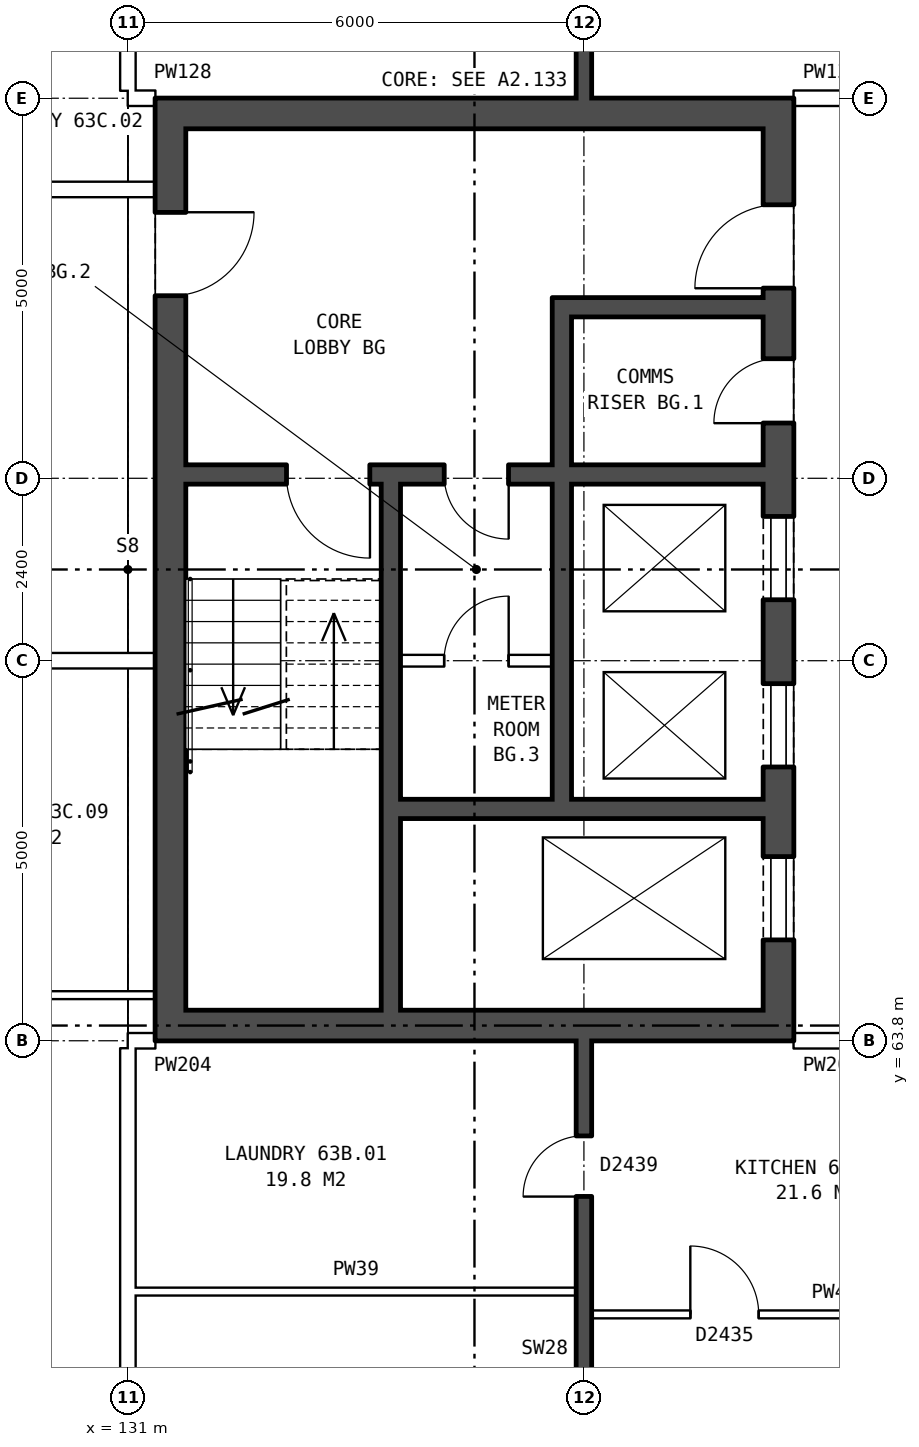
"""IFC4 building model, lengths in metres.
Left out: names, types, materials, properties, quantities, classifications, styles, units other than length and angle.
Written with IfcOpenShell. Run it as: python <this file> out.ifc"""

import sys

from ifc_helpers import new_model, si_unit, direction, frame, frame_2d, origin, place, context, subcontext, project, spatial, rectangle, extrude, element, fill, save


model = new_model("IFC4")
c1 = context("Model", 3, precision=1e-05, world=origin(), true_north=direction((0.0, 1.0)))
c2 = subcontext(c1, "Body", "Model", "MODEL_VIEW")
j1 = project(units=[si_unit("LENGTHUNIT", "METRE"), si_unit("PLANEANGLEUNIT", "RADIAN")], contexts=[c1])
p1 = place(None, origin())
s1 = spatial("IfcSite", under=j1, at=p1, CompositionType="ELEMENT")
p2 = place(p1, origin())
s2 = spatial("IfcBuilding", under=s1, at=p2, CompositionType="ELEMENT")
p3 = place(p2, frame((0.0, 0.0, 224.5)))
s3 = spatial("IfcBuildingStorey", under=s2, at=p3, CompositionType="ELEMENT", Elevation=224.5)
p4 = place(p3, frame((139.56, 63.8, 0.0), z_axis=(0.0, 0.0, 1.0), x_axis=(0.0, 1.0, 0.0)))
e1 = element("IfcWall", 1, at=p4, inside=s3, PredefinedType="SHEAR", context=c2, shape_type="SweptSolid", body=[
    extrude(rectangle(XDim=12.4, YDim=0.4, at=frame_2d((6.2, 0.0))), origin(), (0.0, 0.0, 1.0), 2.85),
])
p5 = place(p4, frame((1.325, 0.0, 0.0)))
e2 = element("IfcOpeningElement", 2, at=p5, cuts=e1, PredefinedType="OPENING", context=c2, shape_type="SweptSolid", body=[
    extrude(rectangle(XDim=1.1, YDim=2.1, at=frame_2d((0.55, 1.05))), frame((0.0, 0.21, 0.0), z_axis=(0.0, -1.0, 0.0), x_axis=(1.0, 0.0, 0.0)), (0.0, 0.0, 1.0), 0.42),
])
p6 = place(p4, frame((3.6, 0.0, 0.0)))
e3 = element("IfcOpeningElement", 3, at=p6, cuts=e1, PredefinedType="OPENING", context=c2, shape_type="SweptSolid", body=[
    extrude(rectangle(XDim=1.1, YDim=2.1, at=frame_2d((0.55, 1.05))), frame((0.0, 0.21, 0.0), z_axis=(0.0, -1.0, 0.0), x_axis=(1.0, 0.0, 0.0)), (0.0, 0.0, 1.0), 0.42),
])
p7 = place(p4, frame((5.8, 0.0, 0.0)))
e4 = element("IfcOpeningElement", 4, at=p7, cuts=e1, PredefinedType="OPENING", context=c2, shape_type="SweptSolid", body=[
    extrude(rectangle(XDim=1.1, YDim=2.1, at=frame_2d((0.55, 1.05))), frame((0.0, 0.21, 0.0), z_axis=(0.0, -1.0, 0.0), x_axis=(1.0, 0.0, 0.0)), (0.0, 0.0, 1.0), 0.42),
])
p8 = place(p4, frame((9.9, 0.0, 0.0)))
e5 = element("IfcOpeningElement", 5, at=p8, cuts=e1, PredefinedType="OPENING", context=c2, shape_type="SweptSolid", body=[
    extrude(rectangle(XDim=1.1, YDim=2.1, at=frame_2d((0.55, 1.05))), frame((0.0, 0.21, 0.0), z_axis=(0.0, -1.0, 0.0), x_axis=(1.0, 0.0, 0.0)), (0.0, 0.0, 1.0), 0.42),
])
p9 = place(p4, frame((8.125, 0.0, 0.0)))
e6 = element("IfcOpeningElement", 6, at=p9, cuts=e1, PredefinedType="OPENING", context=c2, shape_type="SweptSolid", body=[
    extrude(rectangle(XDim=0.85, YDim=2.1, at=frame_2d((0.425, 1.05))), frame((0.0, 0.21, 0.0), z_axis=(0.0, -1.0, 0.0), x_axis=(1.0, 0.0, 0.0)), (0.0, 0.0, 1.0), 0.42),
])
p10 = place(p3, frame((131.56, 63.8, 0.0), z_axis=(0.0, 0.0, 1.0), x_axis=(0.0, 1.0, 0.0)))
e7 = element("IfcWall", 7, at=p10, inside=s3, PredefinedType="SHEAR", context=c2, shape_type="SweptSolid", body=[
    extrude(rectangle(XDim=12.4, YDim=0.4, at=frame_2d((6.2, 0.0))), origin(), (0.0, 0.0, 1.0), 2.85),
])
p11 = place(p10, frame((9.8, 0.0, 0.0)))
e8 = element("IfcOpeningElement", 8, at=p11, cuts=e7, PredefinedType="OPENING", context=c2, shape_type="SweptSolid", body=[
    extrude(rectangle(XDim=1.1, YDim=2.1, at=frame_2d((0.55, 1.05))), frame((0.0, 0.21, 0.0), z_axis=(0.0, -1.0, 0.0), x_axis=(1.0, 0.0, 0.0)), (0.0, 0.0, 1.0), 0.42),
])
for number, where, z_axis, x_axis in (
    (9, (139.36, 64.0, 0.0), (0.0, 0.0, 1.0), (-1.0, 0.0, 0.0)),
    (10, (139.36, 76.0, 0.0), (0.0, 0.0, 1.0), (-1.0, 0.0, 0.0)),
):
    element("IfcWall", number, at=place(p3, frame(where, z_axis=z_axis, x_axis=x_axis)), inside=s3, PredefinedType="SHEAR", context=c2, shape_type="SweptSolid", body=[
        extrude(rectangle(XDim=7.6, YDim=0.4, at=frame_2d((3.8, 0.0))), origin(), (0.0, 0.0, 1.0), 2.85),
    ])
p12 = place(p3, frame((139.36, 66.85, 0.0), z_axis=(0.0, 0.0, 1.0), x_axis=(-1.0, 0.0, 0.0)))
e11 = element("IfcWall", 11, at=p12, inside=s3, PredefinedType="SHEAR", context=c2, shape_type="SweptSolid", body=[
    extrude(rectangle(XDim=4.775, YDim=0.25, at=frame_2d((2.388, 0.0))), origin(), (0.0, 0.0, 1.0), 2.85),
])
p13 = place(p3, frame((136.585, 68.8, 0.0), z_axis=(0.0, 0.0, 1.0), x_axis=(-1.0, 0.0, 0.0)))
e12 = element("IfcWall", 12, at=p13, inside=s3, PredefinedType="PARTITIONING", context=c2, shape_type="SweptSolid", body=[
    extrude(rectangle(XDim=2.0, YDim=0.15, at=frame_2d((1.0, 0.0))), origin(), (0.0, 0.0, 1.0), 2.85),
])
p14 = place(p13, frame((0.575, 0.0, 0.0)))
e13 = element("IfcOpeningElement", 13, at=p14, cuts=e12, PredefinedType="OPENING", context=c2, shape_type="SweptSolid", body=[
    extrude(rectangle(XDim=0.85, YDim=2.1, at=frame_2d((0.425, 1.05))), frame((0.0, 0.085, 0.0), z_axis=(0.0, -1.0, 0.0), x_axis=(1.0, 0.0, 0.0)), (0.0, 0.0, 1.0), 0.17),
])
p15 = place(p3, frame((139.36, 71.25, 0.0), z_axis=(0.0, 0.0, 1.0), x_axis=(-1.0, 0.0, 0.0)))
e14 = element("IfcWall", 14, at=p15, inside=s3, PredefinedType="SHEAR", context=c2, shape_type="SweptSolid", body=[
    extrude(rectangle(XDim=7.6, YDim=0.25, at=frame_2d((3.8, 0.0))), origin(), (0.0, 0.0, 1.0), 2.85),
])
p16 = place(p15, frame((5.175, 0.0, 0.0)))
e15 = element("IfcOpeningElement", 15, at=p16, cuts=e14, PredefinedType="OPENING", context=c2, shape_type="SweptSolid", body=[
    extrude(rectangle(XDim=1.1, YDim=2.1, at=frame_2d((0.55, 1.05))), frame((0.0, 0.135, 0.0), z_axis=(0.0, -1.0, 0.0), x_axis=(1.0, 0.0, 0.0)), (0.0, 0.0, 1.0), 0.27),
])
p17 = place(p15, frame((3.35, 0.0, 0.0)))
e16 = element("IfcOpeningElement", 16, at=p17, cuts=e14, PredefinedType="OPENING", context=c2, shape_type="SweptSolid", body=[
    extrude(rectangle(XDim=0.85, YDim=2.1, at=frame_2d((0.425, 1.05))), frame((0.0, 0.135, 0.0), z_axis=(0.0, -1.0, 0.0), x_axis=(1.0, 0.0, 0.0)), (0.0, 0.0, 1.0), 0.27),
])
p18 = place(p3, frame((139.36, 73.45, 0.0), z_axis=(0.0, 0.0, 1.0), x_axis=(-1.0, 0.0, 0.0)))
e17 = element("IfcWall", 17, at=p18, inside=s3, PredefinedType="SHEAR", context=c2, shape_type="SweptSolid", body=[
    extrude(rectangle(XDim=2.525, YDim=0.25, at=frame_2d((1.263, 0.0))), origin(), (0.0, 0.0, 1.0), 2.85),
])
p19 = place(p3, frame((136.71, 66.975, 0.0), z_axis=(0.0, 0.0, 1.0), x_axis=(0.0, 1.0, 0.0)))
e18 = element("IfcWall", 18, at=p19, inside=s3, PredefinedType="SHEAR", context=c2, shape_type="SweptSolid", body=[
    extrude(rectangle(XDim=4.15, YDim=0.25, at=frame_2d((2.075, 0.0))), origin(), (0.0, 0.0, 1.0), 2.85),
])
p20 = place(p3, frame((136.71, 71.375, 0.0), z_axis=(0.0, 0.0, 1.0), x_axis=(0.0, 1.0, 0.0)))
e19 = element("IfcWall", 19, at=p20, inside=s3, PredefinedType="SHEAR", context=c2, shape_type="SweptSolid", body=[
    extrude(rectangle(XDim=2.2, YDim=0.25, at=frame_2d((1.1, 0.0))), origin(), (0.0, 0.0, 1.0), 2.85),
])
p21 = place(p3, frame((134.46, 64.2, 0.0), z_axis=(0.0, 0.0, 1.0), x_axis=(0.0, 1.0, 0.0)))
e20 = element("IfcWall", 20, at=p21, inside=s3, PredefinedType="SHEAR", context=c2, shape_type="SweptSolid", body=[
    extrude(rectangle(XDim=6.925, YDim=0.25, at=frame_2d((3.462, 0.0))), origin(), (0.0, 0.0, 1.0), 2.85),
])
p22 = place(p3, frame((137.1, 60.2, 0.0), z_axis=(0.0, 0.0, 1.0), x_axis=(1.0, 0.0, 0.0)))
e21 = element("IfcWall", 21, at=p22, inside=s3, PredefinedType="PARTITIONING", context=c2, shape_type="SweptSolid", body=[
    extrude(rectangle(XDim=5.8, YDim=0.1, at=frame_2d((2.9, 0.0))), origin(), (0.0, 0.0, 1.0), 2.85),
])
p23 = place(p22, frame((1.3, 0.0, 0.0)))
e22 = element("IfcOpeningElement", 22, at=p23, cuts=e21, PredefinedType="OPENING", context=c2, shape_type="SweptSolid", body=[
    extrude(rectangle(XDim=0.9, YDim=2.1, at=frame_2d((0.45, 1.05))), frame((0.0, 0.06, 0.0), z_axis=(0.0, -1.0, 0.0), x_axis=(1.0, 0.0, 0.0)), (0.0, 0.0, 1.0), 0.12),
])
p24 = place(p22, frame((4.2, 0.0, 0.0)))
e23 = element("IfcOpeningElement", 23, at=p24, cuts=e21, PredefinedType="OPENING", context=c2, shape_type="SweptSolid", body=[
    extrude(rectangle(XDim=0.9, YDim=2.1, at=frame_2d((0.45, 1.05))), frame((0.0, 0.06, 0.0), z_axis=(0.0, -1.0, 0.0), x_axis=(1.0, 0.0, 0.0)), (0.0, 0.0, 1.0), 0.12),
])
p25 = place(p3, frame((131.1, 60.5, 0.0), z_axis=(0.0, 0.0, 1.0), x_axis=(1.0, 0.0, 0.0)))
e24 = element("IfcWall", 24, at=p25, inside=s3, PredefinedType="PARTITIONING", context=c2, shape_type="SweptSolid", body=[
    extrude(rectangle(XDim=5.8, YDim=0.1, at=frame_2d((2.9, 0.0))), origin(), (0.0, 0.0, 1.0), 2.85),
])
p26 = place(p3, frame((131.0, 63.8, 0.0), z_axis=(0.0, 0.0, 1.0), x_axis=(1.0, 0.0, 0.0)))
e25 = element("IfcWall", 25, at=p26, inside=s3, PredefinedType="PARTITIONING", context=c2, shape_type="SweptSolid", body=[
    extrude(rectangle(XDim=0.36, YDim=0.2, at=frame_2d((0.18, 0.0))), origin(), (0.0, 0.0, 1.0), 2.85),
])
p27 = place(p3, frame((139.76, 63.8, 0.0), z_axis=(0.0, 0.0, 1.0), x_axis=(1.0, 0.0, 0.0)))
e26 = element("IfcWall", 26, at=p27, inside=s3, PredefinedType="PARTITIONING", context=c2, shape_type="SweptSolid", body=[
    extrude(rectangle(XDim=3.0, YDim=0.2, at=frame_2d((1.5, 0.0))), origin(), (0.0, 0.0, 1.0), 2.85),
])
p28 = place(p27, frame((1.0, 0.0, 0.0)))
e27 = element("IfcOpeningElement", 27, at=p28, cuts=e26, PredefinedType="OPENING", context=c2, shape_type="SweptSolid", body=[
    extrude(rectangle(XDim=1.0, YDim=2.1, at=frame_2d((0.5, 1.05))), frame((0.0, 0.11, 0.0), z_axis=(0.0, -1.0, 0.0), x_axis=(1.0, 0.0, 0.0)), (0.0, 0.0, 1.0), 0.22),
])
p29 = place(p3, frame((127.912, 64.4, 0.0), z_axis=(0.0, 0.0, 1.0), x_axis=(1.0, 0.0, 0.0)))
e28 = element("IfcWall", 28, at=p29, inside=s3, PredefinedType="PARTITIONING", context=c2, shape_type="SweptSolid", body=[
    extrude(rectangle(XDim=3.448, YDim=0.1, at=frame_2d((1.724, 0.0))), origin(), (0.0, 0.0, 1.0), 2.85),
])
p30 = place(p3, frame((75.64, 68.8, 0.0), z_axis=(0.0, 0.0, 1.0), x_axis=(1.0, 0.0, 0.0)))
e29 = element("IfcWall", 29, at=p30, inside=s3, PredefinedType="PARTITIONING", context=c2, shape_type="SweptSolid", body=[
    extrude(rectangle(XDim=55.72, YDim=0.2, at=frame_2d((27.86, 0.0))), origin(), (0.0, 0.0, 1.0), 2.85),
])
p31 = place(p30, frame((1.399, 0.0, 0.0)))
e30 = element("IfcOpeningElement", 30, at=p31, cuts=e29, PredefinedType="OPENING", context=c2, shape_type="SweptSolid", body=[
    extrude(rectangle(XDim=1.0, YDim=2.1, at=frame_2d((0.5, 1.05))), frame((0.0, 0.11, 0.0), z_axis=(0.0, -1.0, 0.0), x_axis=(1.0, 0.0, 0.0)), (0.0, 0.0, 1.0), 0.22),
])
p32 = place(p30, frame((12.241, 0.0, 0.0)))
e31 = element("IfcOpeningElement", 31, at=p32, cuts=e29, PredefinedType="OPENING", context=c2, shape_type="SweptSolid", body=[
    extrude(rectangle(XDim=1.0, YDim=2.1, at=frame_2d((0.5, 1.05))), frame((0.0, 0.11, 0.0), z_axis=(0.0, -1.0, 0.0), x_axis=(1.0, 0.0, 0.0)), (0.0, 0.0, 1.0), 0.22),
])
p33 = place(p30, frame((22.553, 0.0, 0.0)))
e32 = element("IfcOpeningElement", 32, at=p33, cuts=e29, PredefinedType="OPENING", context=c2, shape_type="SweptSolid", body=[
    extrude(rectangle(XDim=1.0, YDim=2.1, at=frame_2d((0.5, 1.05))), frame((0.0, 0.11, 0.0), z_axis=(0.0, -1.0, 0.0), x_axis=(1.0, 0.0, 0.0)), (0.0, 0.0, 1.0), 0.22),
])
p34 = place(p30, frame((32.866, 0.0, 0.0)))
e33 = element("IfcOpeningElement", 33, at=p34, cuts=e29, PredefinedType="OPENING", context=c2, shape_type="SweptSolid", body=[
    extrude(rectangle(XDim=1.0, YDim=2.1, at=frame_2d((0.5, 1.05))), frame((0.0, 0.11, 0.0), z_axis=(0.0, -1.0, 0.0), x_axis=(1.0, 0.0, 0.0)), (0.0, 0.0, 1.0), 0.22),
])
p35 = place(p30, frame((36.303, 0.0, 0.0)))
e34 = element("IfcOpeningElement", 34, at=p35, cuts=e29, PredefinedType="OPENING", context=c2, shape_type="SweptSolid", body=[
    extrude(rectangle(XDim=1.0, YDim=2.1, at=frame_2d((0.5, 1.05))), frame((0.0, 0.11, 0.0), z_axis=(0.0, -1.0, 0.0), x_axis=(1.0, 0.0, 0.0)), (0.0, 0.0, 1.0), 0.22),
])
p36 = place(p30, frame((46.616, 0.0, 0.0)))
e35 = element("IfcOpeningElement", 35, at=p36, cuts=e29, PredefinedType="OPENING", context=c2, shape_type="SweptSolid", body=[
    extrude(rectangle(XDim=1.0, YDim=2.1, at=frame_2d((0.5, 1.05))), frame((0.0, 0.11, 0.0), z_axis=(0.0, -1.0, 0.0), x_axis=(1.0, 0.0, 0.0)), (0.0, 0.0, 1.0), 0.22),
])
p37 = place(p30, frame((50.053, 0.0, 0.0)))
e36 = element("IfcOpeningElement", 36, at=p37, cuts=e29, PredefinedType="OPENING", context=c2, shape_type="SweptSolid", body=[
    extrude(rectangle(XDim=1.0, YDim=2.1, at=frame_2d((0.5, 1.05))), frame((0.0, 0.11, 0.0), z_axis=(0.0, -1.0, 0.0), x_axis=(1.0, 0.0, 0.0)), (0.0, 0.0, 1.0), 0.22),
])
p38 = place(p3, frame((124.475, 75.0, 0.0), z_axis=(0.0, 0.0, 1.0), x_axis=(1.0, 0.0, 0.0)))
e37 = element("IfcWall", 37, at=p38, inside=s3, PredefinedType="PARTITIONING", context=c2, shape_type="SweptSolid", body=[
    extrude(rectangle(XDim=6.885, YDim=0.2, at=frame_2d((3.442, 0.0))), origin(), (0.0, 0.0, 1.0), 2.85),
])
p39 = place(p38, frame((2.992, 0.0, 0.0)))
e38 = element("IfcOpeningElement", 38, at=p39, cuts=e37, PredefinedType="OPENING", context=c2, shape_type="SweptSolid", body=[
    extrude(rectangle(XDim=0.9, YDim=2.1, at=frame_2d((0.45, 1.05))), frame((0.0, 0.11, 0.0), z_axis=(0.0, -1.0, 0.0), x_axis=(1.0, 0.0, 0.0)), (0.0, 0.0, 1.0), 0.22),
])
p40 = place(p3, frame((131.0, 76.2, 0.0), z_axis=(0.0, 0.0, 1.0), x_axis=(1.0, 0.0, 0.0)))
e39 = element("IfcWall", 39, at=p40, inside=s3, PredefinedType="PARTITIONING", context=c2, shape_type="SweptSolid", body=[
    extrude(rectangle(XDim=0.36, YDim=0.2, at=frame_2d((0.18, 0.0))), origin(), (0.0, 0.0, 1.0), 2.85),
])
p41 = place(p3, frame((139.76, 76.2, 0.0), z_axis=(0.0, 0.0, 1.0), x_axis=(1.0, 0.0, 0.0)))
e40 = element("IfcWall", 40, at=p41, inside=s3, PredefinedType="PARTITIONING", context=c2, shape_type="SweptSolid", body=[
    extrude(rectangle(XDim=3.0, YDim=0.2, at=frame_2d((1.5, 0.0))), origin(), (0.0, 0.0, 1.0), 2.85),
])
p42 = place(p41, frame((1.0, 0.0, 0.0)))
e41 = element("IfcOpeningElement", 41, at=p42, cuts=e40, PredefinedType="OPENING", context=c2, shape_type="SweptSolid", body=[
    extrude(rectangle(XDim=1.0, YDim=2.1, at=frame_2d((0.5, 1.05))), frame((0.0, 0.11, 0.0), z_axis=(0.0, -1.0, 0.0), x_axis=(1.0, 0.0, 0.0)), (0.0, 0.0, 1.0), 0.22),
])
for number, where, z_axis, x_axis in (
    (42, (131.0, 54.36, 0.0), (0.0, 0.0, 1.0), (0.0, 1.0, 0.0)),
    (43, (131.0, 76.3, 0.0), (0.0, 0.0, 1.0), (0.0, 1.0, 0.0)),
):
    element("IfcWall", number, at=place(p3, frame(where, z_axis=z_axis, x_axis=x_axis)), inside=s3, PredefinedType="PARTITIONING", context=c2, shape_type="SweptSolid", body=[
        extrude(rectangle(XDim=9.34, YDim=0.2, at=frame_2d((4.67, 0.0))), origin(), (0.0, 0.0, 1.0), 2.85),
    ])
p43 = place(p3, frame((137.0, 54.36, 0.0), z_axis=(0.0, 0.0, 1.0), x_axis=(0.0, 1.0, 0.0)))
e44 = element("IfcWall", 44, at=p43, inside=s3, PredefinedType="SOLIDWALL", context=c2, shape_type="SweptSolid", body=[
    extrude(rectangle(XDim=9.44, YDim=0.2, at=frame_2d((4.72, 0.0))), origin(), (0.0, 0.0, 1.0), 2.85),
])
p44 = place(p43, frame((2.47, 0.0, 0.0)))
e45 = element("IfcOpeningElement", 45, at=p44, cuts=e44, PredefinedType="OPENING", context=c2, shape_type="SweptSolid", body=[
    extrude(rectangle(XDim=0.9, YDim=2.1, at=frame_2d((0.45, 1.05))), frame((0.0, 0.11, 0.0), z_axis=(0.0, -1.0, 0.0), x_axis=(1.0, 0.0, 0.0)), (0.0, 0.0, 1.0), 0.22),
])
p45 = place(p43, frame((7.39, 0.0, 0.0)))
e46 = element("IfcOpeningElement", 46, at=p45, cuts=e44, PredefinedType="OPENING", context=c2, shape_type="SweptSolid", body=[
    extrude(rectangle(XDim=0.8, YDim=2.1, at=frame_2d((0.4, 1.05))), frame((0.0, 0.11, 0.0), z_axis=(0.0, -1.0, 0.0), x_axis=(1.0, 0.0, 0.0)), (0.0, 0.0, 1.0), 0.22),
])
p46 = place(p3, frame((137.0, 76.2, 0.0), z_axis=(0.0, 0.0, 1.0), x_axis=(0.0, 1.0, 0.0)))
e47 = element("IfcWall", 47, at=p46, inside=s3, PredefinedType="SOLIDWALL", context=c2, shape_type="SweptSolid", body=[
    extrude(rectangle(XDim=9.44, YDim=0.2, at=frame_2d((4.72, 0.0))), origin(), (0.0, 0.0, 1.0), 2.85),
])
p47 = place(p46, frame((5.92, 0.0, 0.0)))
e48 = element("IfcOpeningElement", 48, at=p47, cuts=e47, PredefinedType="OPENING", context=c2, shape_type="SweptSolid", body=[
    extrude(rectangle(XDim=0.9, YDim=2.1, at=frame_2d((0.45, 1.05))), frame((0.0, 0.11, 0.0), z_axis=(0.0, -1.0, 0.0), x_axis=(1.0, 0.0, 0.0)), (0.0, 0.0, 1.0), 0.22),
])
p48 = place(p46, frame((1.25, 0.0, 0.0)))
e49 = element("IfcOpeningElement", 49, at=p48, cuts=e47, PredefinedType="OPENING", context=c2, shape_type="SweptSolid", body=[
    extrude(rectangle(XDim=0.8, YDim=2.1, at=frame_2d((0.4, 1.05))), frame((0.0, 0.11, 0.0), z_axis=(0.0, -1.0, 0.0), x_axis=(1.0, 0.0, 0.0)), (0.0, 0.0, 1.0), 0.22),
])
p49 = place(p5, origin())
e50 = element("IfcDoor", 50, at=p49, inside=s3, OperationType="DOUBLE_DOOR_SLIDING", PredefinedType="DOOR", context=c2, shape_type="SweptSolid", body=[
    extrude(rectangle(XDim=1.1, YDim=2.1, at=frame_2d((0.55, 1.05))), frame((0.0, 0.185, 0.0), z_axis=(0.0, -1.0, 0.0), x_axis=(1.0, 0.0, 0.0)), (0.0, 0.0, 1.0), 0.05),
])
fill(e2, e50)
p50 = place(p6, origin())
e51 = element("IfcDoor", 51, at=p50, inside=s3, OperationType="DOUBLE_DOOR_SLIDING", PredefinedType="DOOR", context=c2, shape_type="SweptSolid", body=[
    extrude(rectangle(XDim=1.1, YDim=2.1, at=frame_2d((0.55, 1.05))), frame((0.0, 0.185, 0.0), z_axis=(0.0, -1.0, 0.0), x_axis=(1.0, 0.0, 0.0)), (0.0, 0.0, 1.0), 0.05),
])
fill(e3, e51)
p51 = place(p7, origin())
e52 = element("IfcDoor", 52, at=p51, inside=s3, OperationType="DOUBLE_DOOR_SLIDING", PredefinedType="DOOR", context=c2, shape_type="SweptSolid", body=[
    extrude(rectangle(XDim=1.1, YDim=2.1, at=frame_2d((0.55, 1.05))), frame((0.0, 0.185, 0.0), z_axis=(0.0, -1.0, 0.0), x_axis=(1.0, 0.0, 0.0)), (0.0, 0.0, 1.0), 0.05),
])
fill(e4, e52)
p52 = place(p8, origin())
e53 = element("IfcDoor", 53, at=p52, inside=s3, OperationType="SINGLE_SWING_LEFT", PredefinedType="DOOR", context=c2, shape_type="SweptSolid", body=[
    extrude(rectangle(XDim=1.1, YDim=2.1, at=frame_2d((0.55, 1.05))), frame((0.0, 0.185, 0.0), z_axis=(0.0, -1.0, 0.0), x_axis=(1.0, 0.0, 0.0)), (0.0, 0.0, 1.0), 0.05),
])
fill(e5, e53)
p53 = place(p16, origin())
e54 = element("IfcDoor", 54, at=p53, inside=s3, OperationType="SINGLE_SWING_LEFT", PredefinedType="DOOR", context=c2, shape_type="SweptSolid", body=[
    extrude(rectangle(XDim=1.1, YDim=2.1, at=frame_2d((0.55, 1.05))), frame((0.0, 0.025, 0.0), z_axis=(0.0, -1.0, 0.0), x_axis=(1.0, 0.0, 0.0)), (0.0, 0.0, 1.0), 0.05),
])
fill(e15, e54)
p54 = place(p9, origin())
e55 = element("IfcDoor", 55, at=p54, inside=s3, OperationType="SINGLE_SWING_LEFT", PredefinedType="DOOR", context=c2, shape_type="SweptSolid", body=[
    extrude(rectangle(XDim=0.85, YDim=2.1, at=frame_2d((0.425, 1.05))), frame((0.0, 0.185, 0.0), z_axis=(0.0, -1.0, 0.0), x_axis=(1.0, 0.0, 0.0)), (0.0, 0.0, 1.0), 0.05),
])
fill(e6, e55)
p55 = place(p17, origin())
e56 = element("IfcDoor", 56, at=p55, inside=s3, OperationType="SINGLE_SWING_LEFT", PredefinedType="DOOR", context=c2, shape_type="SweptSolid", body=[
    extrude(rectangle(XDim=0.85, YDim=2.1, at=frame_2d((0.425, 1.05))), frame((0.0, 0.025, 0.0), z_axis=(0.0, -1.0, 0.0), x_axis=(1.0, 0.0, 0.0)), (0.0, 0.0, 1.0), 0.05),
])
fill(e16, e56)
p56 = place(p14, frame((0.85, 0.0, 0.0), z_axis=(0.0, 0.0, 1.0), x_axis=(-1.0, 0.0, 0.0)))
e57 = element("IfcDoor", 57, at=p56, inside=s3, OperationType="SINGLE_SWING_RIGHT", PredefinedType="DOOR", context=c2, shape_type="SweptSolid", body=[
    extrude(rectangle(XDim=0.85, YDim=2.1, at=frame_2d((0.425, 1.05))), frame((0.0, 0.025, 0.0), z_axis=(0.0, -1.0, 0.0), x_axis=(1.0, 0.0, 0.0)), (0.0, 0.0, 1.0), 0.05),
])
fill(e13, e57)
p57 = place(p11, frame((1.1, 0.0, 0.0), z_axis=(0.0, 0.0, 1.0), x_axis=(-1.0, 0.0, 0.0)))
e58 = element("IfcDoor", 58, at=p57, inside=s3, OperationType="SINGLE_SWING_LEFT", PredefinedType="DOOR", context=c2, shape_type="SweptSolid", body=[
    extrude(rectangle(XDim=1.1, YDim=2.1, at=frame_2d((0.55, 1.05))), frame((0.0, 0.185, 0.0), z_axis=(0.0, -1.0, 0.0), x_axis=(1.0, 0.0, 0.0)), (0.0, 0.0, 1.0), 0.05),
])
fill(e8, e58)
p58 = place(p23, origin())
e59 = element("IfcDoor", 59, at=p58, inside=s3, OperationType="SINGLE_SWING_LEFT", PredefinedType="DOOR", context=c2, shape_type="SweptSolid", body=[
    extrude(rectangle(XDim=0.9, YDim=2.1, at=frame_2d((0.45, 1.05))), frame((0.0, 0.025, 0.0), z_axis=(0.0, -1.0, 0.0), x_axis=(1.0, 0.0, 0.0)), (0.0, 0.0, 1.0), 0.05),
])
fill(e22, e59)
p59 = place(p45, origin())
e60 = element("IfcDoor", 60, at=p59, inside=s3, OperationType="SINGLE_SWING_LEFT", PredefinedType="DOOR", context=c2, shape_type="SweptSolid", body=[
    extrude(rectangle(XDim=0.8, YDim=2.1, at=frame_2d((0.4, 1.05))), frame((0.0, 0.025, 0.0), z_axis=(0.0, -1.0, 0.0), x_axis=(1.0, 0.0, 0.0)), (0.0, 0.0, 1.0), 0.05),
])
fill(e46, e60)
save(model, sys.argv[1])
